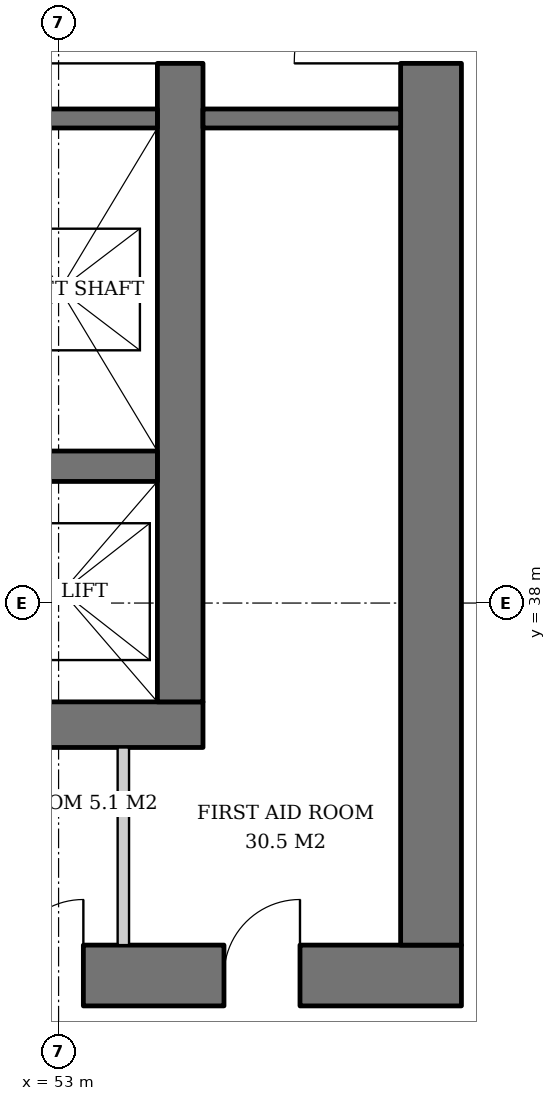
"""IFC4 building model, lengths in metres.
Left out: names, types, materials, properties, quantities, classifications, styles, units other than length and angle.
Written with IfcOpenShell. Run it as: python <this file> out.ifc"""

import sys

from ifc_helpers import new_model, si_unit, direction, frame, frame_2d, origin, place, context, subcontext, project, spatial, rectangle, extrude, element, fill, save


model = new_model("IFC4")
c1 = context("Model", 3, precision=1e-05, world=origin(), true_north=direction((0.0, 1.0)))
c2 = subcontext(c1, "Body", "Model", "MODEL_VIEW")
j1 = project(units=[si_unit("LENGTHUNIT", "METRE"), si_unit("PLANEANGLEUNIT", "RADIAN")], contexts=[c1])
p1 = place(None, origin())
s1 = spatial("IfcSite", under=j1, at=p1, CompositionType="ELEMENT")
p2 = place(p1, origin())
s2 = spatial("IfcBuilding", under=s1, at=p2, CompositionType="ELEMENT")
p3 = place(p2, frame((0.0, 0.0, 78.0)))
s3 = spatial("IfcBuildingStorey", under=s2, at=p3, CompositionType="ELEMENT", Elevation=78.0)
p4 = place(p3, frame((35.1, 36.4, 0.0), z_axis=(0.0, 0.0, 1.0), x_axis=(1.0, 0.0, 0.0)))
e1 = element("IfcWall", 1, at=p4, inside=s3, PredefinedType="SHEAR", context=c2, shape_type="SweptSolid", body=[
    extrude(rectangle(XDim=19.8, YDim=0.6, at=frame_2d((9.9, 0.0))), origin(), (0.0, 0.0, 1.0), 3.8),
])
p5 = place(p4, frame((3.9, 0.0, 0.0)))
e2 = element("IfcOpeningElement", 2, at=p5, cuts=e1, PredefinedType="OPENING", context=c2, shape_type="SweptSolid", body=[
    extrude(rectangle(XDim=1.0, YDim=2.1, at=frame_2d((0.5, 1.05))), frame((0.0, 0.31, 0.0), z_axis=(0.0, -1.0, 0.0), x_axis=(1.0, 0.0, 0.0)), (0.0, 0.0, 1.0), 0.62),
])
p6 = place(p4, frame((15.35, 0.0, 0.0)))
e3 = element("IfcOpeningElement", 3, at=p6, cuts=e1, PredefinedType="OPENING", context=c2, shape_type="SweptSolid", body=[
    extrude(rectangle(XDim=1.0, YDim=2.1, at=frame_2d((0.5, 1.05))), frame((0.0, 0.31, 0.0), z_axis=(0.0, -1.0, 0.0), x_axis=(1.0, 0.0, 0.0)), (0.0, 0.0, 1.0), 0.62),
])
p7 = place(p3, frame((54.6, 36.7, 0.0), z_axis=(0.0, 0.0, 1.0), x_axis=(0.0, 1.0, 0.0)))
e4 = element("IfcWall", 4, at=p7, inside=s3, PredefinedType="SHEAR", context=c2, shape_type="SweptSolid", body=[
    extrude(rectangle(XDim=18.6, YDim=0.6, at=frame_2d((9.3, 0.0))), origin(), (0.0, 0.0, 1.0), 3.8),
])
p8 = place(p7, frame((8.4, 0.0, 0.0)))
e5 = element("IfcOpeningElement", 5, at=p8, cuts=e4, PredefinedType="OPENING", context=c2, shape_type="SweptSolid", body=[
    extrude(rectangle(XDim=1.8, YDim=2.4, at=frame_2d((0.9, 1.2))), frame((0.0, 0.31, 0.0), z_axis=(0.0, -1.0, 0.0), x_axis=(1.0, 0.0, 0.0)), (0.0, 0.0, 1.0), 0.62),
])
p9 = place(p3, frame((31.7, 33.1, 0.0), z_axis=(0.0, 0.0, 1.0), x_axis=(1.0, 0.0, 0.0)))
e6 = element("IfcWall", 6, at=p9, inside=s3, PredefinedType="SHEAR", context=c2, shape_type="SweptSolid", body=[
    extrude(rectangle(XDim=26.6, YDim=0.8, at=frame_2d((13.3, 0.0))), origin(), (0.0, 0.0, 1.0), 3.8),
])
p10 = place(p9, frame((7.3, 0.0, 0.0)))
e7 = element("IfcOpeningElement", 7, at=p10, cuts=e6, PredefinedType="OPENING", context=c2, shape_type="SweptSolid", body=[
    extrude(rectangle(XDim=1.0, YDim=2.1, at=frame_2d((0.5, 1.05))), frame((0.0, 0.41, 0.0), z_axis=(0.0, -1.0, 0.0), x_axis=(1.0, 0.0, 0.0)), (0.0, 0.0, 1.0), 0.82),
])
p11 = place(p9, frame((18.75, 0.0, 0.0)))
e8 = element("IfcOpeningElement", 8, at=p11, cuts=e6, PredefinedType="OPENING", context=c2, shape_type="SweptSolid", body=[
    extrude(rectangle(XDim=1.0, YDim=2.1, at=frame_2d((0.5, 1.05))), frame((0.0, 0.41, 0.0), z_axis=(0.0, -1.0, 0.0), x_axis=(1.0, 0.0, 0.0)), (0.0, 0.0, 1.0), 0.82),
])
p12 = place(p9, frame((1.9, 0.0, 0.0)))
e9 = element("IfcOpeningElement", 9, at=p12, cuts=e6, PredefinedType="OPENING", context=c2, shape_type="SweptSolid", body=[
    extrude(rectangle(XDim=1.0, YDim=2.1, at=frame_2d((0.5, 1.05))), frame((0.0, 0.41, 0.0), z_axis=(0.0, -1.0, 0.0), x_axis=(1.0, 0.0, 0.0)), (0.0, 0.0, 1.0), 0.82),
])
p13 = place(p9, frame((4.725, 0.0, 0.0)))
e10 = element("IfcOpeningElement", 10, at=p13, cuts=e6, PredefinedType="OPENING", context=c2, shape_type="SweptSolid", body=[
    extrude(rectangle(XDim=1.0, YDim=2.1, at=frame_2d((0.5, 1.05))), frame((0.0, 0.41, 0.0), z_axis=(0.0, -1.0, 0.0), x_axis=(1.0, 0.0, 0.0)), (0.0, 0.0, 1.0), 0.82),
])
p14 = place(p9, frame((12.44, 0.0, 0.0)))
e11 = element("IfcOpeningElement", 11, at=p14, cuts=e6, PredefinedType="OPENING", context=c2, shape_type="SweptSolid", body=[
    extrude(rectangle(XDim=1.0, YDim=2.1, at=frame_2d((0.5, 1.05))), frame((0.0, 0.41, 0.0), z_axis=(0.0, -1.0, 0.0), x_axis=(1.0, 0.0, 0.0)), (0.0, 0.0, 1.0), 0.82),
])
p15 = place(p9, frame((20.626, 0.0, 0.0)))
e12 = element("IfcOpeningElement", 12, at=p15, cuts=e6, PredefinedType="OPENING", context=c2, shape_type="SweptSolid", body=[
    extrude(rectangle(XDim=1.0, YDim=2.1, at=frame_2d((0.5, 1.05))), frame((0.0, 0.41, 0.0), z_axis=(0.0, -1.0, 0.0), x_axis=(1.0, 0.0, 0.0)), (0.0, 0.0, 1.0), 0.82),
])
p16 = place(p9, frame((23.476, 0.0, 0.0)))
e13 = element("IfcOpeningElement", 13, at=p16, cuts=e6, PredefinedType="OPENING", context=c2, shape_type="SweptSolid", body=[
    extrude(rectangle(XDim=1.0, YDim=2.1, at=frame_2d((0.5, 1.05))), frame((0.0, 0.41, 0.0), z_axis=(0.0, -1.0, 0.0), x_axis=(1.0, 0.0, 0.0)), (0.0, 0.0, 1.0), 0.82),
])
p17 = place(p3, frame((57.9, 33.5, 0.0), z_axis=(0.0, 0.0, 1.0), x_axis=(0.0, 1.0, 0.0)))
e14 = element("IfcWall", 14, at=p17, inside=s3, PredefinedType="SHEAR", context=c2, shape_type="SweptSolid", body=[
    extrude(rectangle(XDim=25.0, YDim=0.8, at=frame_2d((12.5, 0.0))), origin(), (0.0, 0.0, 1.0), 3.8),
])
p18 = place(p17, frame((11.6, 0.0, 0.0)))
e15 = element("IfcOpeningElement", 15, at=p18, cuts=e14, PredefinedType="OPENING", context=c2, shape_type="SweptSolid", body=[
    extrude(rectangle(XDim=1.8, YDim=2.4, at=frame_2d((0.9, 1.2))), frame((0.0, 0.41, 0.0), z_axis=(0.0, -1.0, 0.0), x_axis=(1.0, 0.0, 0.0)), (0.0, 0.0, 1.0), 0.82),
])
p19 = place(p3, frame((35.7, 39.8, 0.0), z_axis=(0.0, 0.0, 1.0), x_axis=(1.0, 0.0, 0.0)))
e16 = element("IfcWall", 16, at=p19, inside=s3, PredefinedType="SHEAR", context=c2, shape_type="SweptSolid", body=[
    extrude(rectangle(XDim=18.6, YDim=0.4, at=frame_2d((9.3, 0.0))), origin(), (0.0, 0.0, 1.0), 3.8),
])
p20 = place(p3, frame((48.93, 44.375, 0.0), z_axis=(0.0, 0.0, 1.0), x_axis=(1.0, 0.0, 0.0)))
e17 = element("IfcWall", 17, at=p20, inside=s3, PredefinedType="SHEAR", context=c2, shape_type="SweptSolid", body=[
    extrude(rectangle(XDim=5.37, YDim=0.25, at=frame_2d((2.685, 0.0))), origin(), (0.0, 0.0, 1.0), 3.8),
])
p21 = place(p3, frame((54.9, 44.375, 0.0), z_axis=(0.0, 0.0, 1.0), x_axis=(1.0, 0.0, 0.0)))
e18 = element("IfcWall", 18, at=p21, inside=s3, PredefinedType="SOLIDWALL", context=c2, shape_type="SweptSolid", body=[
    extrude(rectangle(XDim=2.6, YDim=0.25, at=frame_2d((1.3, 0.0))), origin(), (0.0, 0.0, 1.0), 3.52),
])
p22 = place(p3, frame((53.852, 33.5, 0.0), z_axis=(0.0, 0.0, 1.0), x_axis=(0.0, 1.0, 0.0)))
e19 = element("IfcWall", 19, at=p22, inside=s3, PredefinedType="SOLIDWALL", context=c2, shape_type="SweptSolid", body=[
    extrude(rectangle(XDim=2.6, YDim=0.15, at=frame_2d((1.3, 0.0))), origin(), (0.0, 0.0, 1.0), 3.52),
])
p23 = place(p8, origin())
e20 = element("IfcDoor", 20, at=p23, inside=s3, OperationType="DOUBLE_DOOR_SINGLE_SWING", PredefinedType="DOOR", context=c2, shape_type="SweptSolid", body=[
    extrude(rectangle(XDim=1.8, YDim=2.4, at=frame_2d((0.9, 1.2))), frame((0.0, 0.025, 0.0), z_axis=(0.0, -1.0, 0.0), x_axis=(1.0, 0.0, 0.0)), (0.0, 0.0, 1.0), 0.05),
])
fill(e5, e20)
p24 = place(p18, origin())
e21 = element("IfcDoor", 21, at=p24, inside=s3, OperationType="DOUBLE_DOOR_SINGLE_SWING", PredefinedType="DOOR", context=c2, shape_type="SweptSolid", body=[
    extrude(rectangle(XDim=1.8, YDim=2.4, at=frame_2d((0.9, 1.2))), frame((0.0, 0.025, 0.0), z_axis=(0.0, -1.0, 0.0), x_axis=(1.0, 0.0, 0.0)), (0.0, 0.0, 1.0), 0.05),
])
fill(e15, e21)
p25 = place(p15, origin())
e22 = element("IfcDoor", 22, at=p25, inside=s3, OperationType="SINGLE_SWING_RIGHT", PredefinedType="DOOR", context=c2, shape_type="SweptSolid", body=[
    extrude(rectangle(XDim=1.0, YDim=2.1, at=frame_2d((0.5, 1.05))), frame((0.0, 0.39, 0.0), z_axis=(0.0, -1.0, 0.0), x_axis=(1.0, 0.0, 0.0)), (0.0, 0.0, 1.0), 0.05),
])
fill(e12, e22)
p26 = place(p16, origin())
e23 = element("IfcDoor", 23, at=p26, inside=s3, OperationType="SINGLE_SWING_RIGHT", PredefinedType="DOOR", context=c2, shape_type="SweptSolid", body=[
    extrude(rectangle(XDim=1.0, YDim=2.1, at=frame_2d((0.5, 1.05))), frame((0.0, 0.39, 0.0), z_axis=(0.0, -1.0, 0.0), x_axis=(1.0, 0.0, 0.0)), (0.0, 0.0, 1.0), 0.05),
])
fill(e13, e23)
save(model, sys.argv[1])
